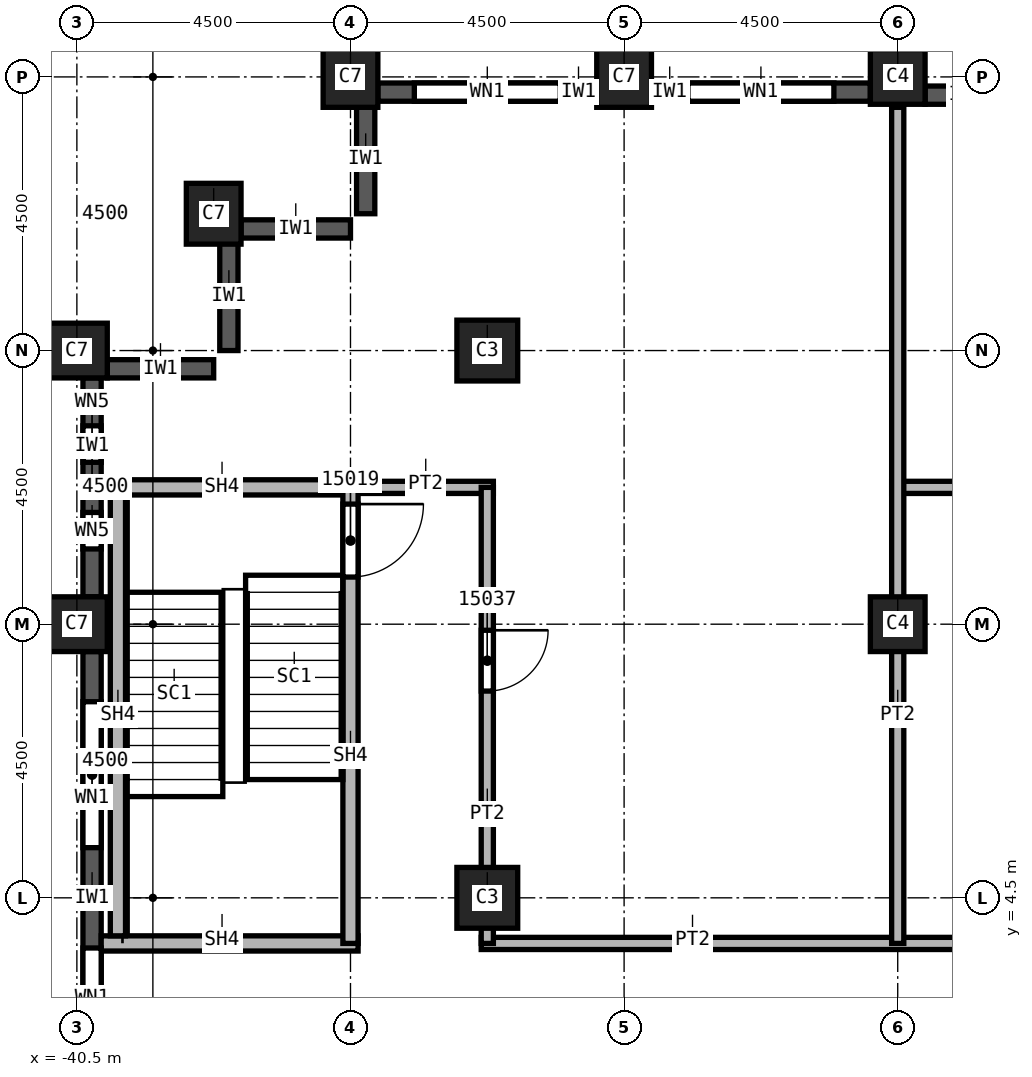
"""IFC4 building model, lengths in metres.
Left out: names, types, materials, properties, quantities, classifications, styles, units other than length and angle.
Written with IfcOpenShell. Run it as: python <this file> out.ifc"""

import sys

from ifc_helpers import new_model, si_unit, direction, frame, frame_2d, origin, origin_2d, place, context, subcontext, project, spatial, rectangle, extrude, element, fill, save


model = new_model("IFC4")
c1 = context("Model", 3, precision=1e-05, world=origin(), true_north=direction((0.0, 1.0)))
c2 = subcontext(c1, "Body", "Model", "MODEL_VIEW")
j1 = project(units=[si_unit("LENGTHUNIT", "METRE"), si_unit("PLANEANGLEUNIT", "RADIAN")], contexts=[c1])
p1 = place(None, origin())
s1 = spatial("IfcSite", under=j1, at=p1, CompositionType="ELEMENT")
p2 = place(p1, origin())
s2 = spatial("IfcBuilding", under=s1, at=p2, CompositionType="ELEMENT")
p3 = place(p2, frame((0.0, 0.0, 228.0)))
s3 = spatial("IfcBuildingStorey", under=s2, at=p3, CompositionType="ELEMENT", Elevation=228.0)
for number, where, z_axis, x_axis in (
    (1, (-40.5, 9.0, 0.0), (0.0, 0.0, 1.0), (0.0, 1.0, 0.0)),
    (2, (-40.5, 13.5, 0.0), (0.0, 0.0, 1.0), (0.0, 1.0, 0.0)),
    (3, (-38.25, 15.75, 0.0), (0.0, 0.0, 1.0), (1.0, 0.0, 0.0)),
    (4, (-31.5, 18.0, 0.0), (0.0, 0.0, 1.0), (1.0, 0.0, 0.0)),
    (5, (-36.0, 18.0, 0.0), (0.0, 0.0, 1.0), (1.0, 0.0, 0.0)),
):
    element("IfcColumn", number, at=place(p3, frame(where, z_axis=z_axis, x_axis=x_axis)), inside=s3, PredefinedType="COLUMN", context=c2, shape_type="SweptSolid", body=[
        extrude(rectangle(XDim=0.9, YDim=1.0, at=origin_2d()), origin(), (0.0, 0.0, 1.0), 3.72),
    ])
for number, where, z_axis, x_axis in (
    (6, (-33.75, 4.5, 0.0), (0.0, 0.0, 1.0), (1.0, 0.0, 0.0)),
    (7, (-33.75, 13.5, 0.0), (0.0, 0.0, 1.0), (1.0, 0.0, 0.0)),
):
    element("IfcColumn", number, at=place(p3, frame(where, z_axis=z_axis, x_axis=x_axis)), inside=s3, PredefinedType="COLUMN", context=c2, shape_type="SweptSolid", body=[
        extrude(rectangle(XDim=1.0, YDim=1.0, at=origin_2d()), origin(), (0.0, 0.0, 1.0), 3.72),
    ])
for number, where, z_axis, x_axis in (
    (8, (-27.0, 9.0, 0.0), (0.0, 0.0, 1.0), (1.0, 0.0, 0.0)),
    (9, (-27.0, 18.0, 0.0), (0.0, 0.0, 1.0), (1.0, 0.0, 0.0)),
):
    element("IfcColumn", number, at=place(p3, frame(where, z_axis=z_axis, x_axis=x_axis)), inside=s3, PredefinedType="COLUMN", context=c2, shape_type="SweptSolid", body=[
        extrude(rectangle(XDim=0.9, YDim=0.9, at=origin_2d()), origin(), (0.0, 0.0, 1.0), 3.72),
    ])
for number, where, z_axis, x_axis in (
    (10, (-35.75, 17.55, 0.0), (0.0, 0.0, 1.0), (0.0, -1.0, 0.0)),
    (11, (-37.8, 15.5, 0.0), (0.0, 0.0, 1.0), (1.0, 0.0, 0.0)),
    (12, (-38.0, 15.3, 0.0), (0.0, 0.0, 1.0), (0.0, -1.0, 0.0)),
):
    element("IfcWall", number, at=place(p3, frame(where, z_axis=z_axis, x_axis=x_axis)), inside=s3, PredefinedType="SOLIDWALL", context=c2, shape_type="SweptSolid", body=[
        extrude(rectangle(XDim=1.8, YDim=0.3, at=frame_2d((0.9, 0.0))), origin(), (0.0, 0.0, 1.0), 3.12),
    ])
p4 = place(p3, frame((-40.0, 13.2, 0.0), z_axis=(0.0, 0.0, 1.0), x_axis=(1.0, 0.0, 0.0)))
e13 = element("IfcWall", 13, at=p4, inside=s3, PredefinedType="SOLIDWALL", context=c2, shape_type="SweptSolid", body=[
    extrude(rectangle(XDim=1.75, YDim=0.3, at=frame_2d((0.875, 0.0))), origin(), (0.0, 0.0, 1.0), 3.12),
])
p5 = place(p3, frame((-25.2, 17.7, 0.0), z_axis=(0.0, 0.0, 1.0), x_axis=(-1.0, 0.0, 0.0)))
e14 = element("IfcWall", 14, at=p5, inside=s3, PredefinedType="SOLIDWALL", context=c2, shape_type="SweptSolid", body=[
    extrude(rectangle(XDim=1.35, YDim=0.3, at=frame_2d((0.675, 0.0))), origin(), (0.0, 0.0, 1.0), 3.12),
])
p6 = place(p3, frame((-27.45, 17.75, 0.0), z_axis=(0.0, 0.0, 1.0), x_axis=(-1.0, 0.0, 0.0)))
e15 = element("IfcWall", 15, at=p6, inside=s3, PredefinedType="SOLIDWALL", context=c2, shape_type="SweptSolid", body=[
    extrude(rectangle(XDim=3.6, YDim=0.3, at=frame_2d((1.8, 0.0))), origin(), (0.0, 0.0, 1.0), 3.12),
])
p7 = place(p6, frame((0.6, 0.0, 0.8)))
e16 = element("IfcOpeningElement", 16, at=p7, cuts=e15, PredefinedType="OPENING", context=c2, shape_type="SweptSolid", body=[
    extrude(rectangle(XDim=2.4, YDim=1.95, at=frame_2d((1.2, 0.975))), frame((0.0, 0.15, 0.0), z_axis=(0.0, -1.0, 0.0), x_axis=(1.0, 0.0, 0.0)), (0.0, 0.0, 1.0), 0.3),
])
p8 = place(p3, frame((-31.95, 17.75, 0.0), z_axis=(0.0, 0.0, 1.0), x_axis=(-1.0, 0.0, 0.0)))
e17 = element("IfcWall", 17, at=p8, inside=s3, PredefinedType="SOLIDWALL", context=c2, shape_type="SweptSolid", body=[
    extrude(rectangle(XDim=3.6, YDim=0.3, at=frame_2d((1.8, 0.0))), origin(), (0.0, 0.0, 1.0), 3.12),
])
p9 = place(p8, frame((0.6, 0.0, 0.8)))
e18 = element("IfcOpeningElement", 18, at=p9, cuts=e17, PredefinedType="OPENING", context=c2, shape_type="SweptSolid", body=[
    extrude(rectangle(XDim=2.4, YDim=1.95, at=frame_2d((1.2, 0.975))), frame((0.0, 0.15, 0.0), z_axis=(0.0, -1.0, 0.0), x_axis=(1.0, 0.0, 0.0)), (0.0, 0.0, 1.0), 0.3),
])
p10 = place(p3, frame((-40.25, 13.05, 0.0), z_axis=(0.0, 0.0, 1.0), x_axis=(0.0, -1.0, 0.0)))
e19 = element("IfcWall", 19, at=p10, inside=s3, PredefinedType="SOLIDWALL", context=c2, shape_type="SweptSolid", body=[
    extrude(rectangle(XDim=3.6, YDim=0.3, at=frame_2d((1.8, 0.0))), origin(), (0.0, 0.0, 1.0), 3.12),
])
p11 = place(p10, frame((0.788, 0.0, 0.8)))
e20 = element("IfcOpeningElement", 20, at=p11, cuts=e19, PredefinedType="OPENING", context=c2, shape_type="SweptSolid", body=[
    extrude(rectangle(XDim=0.6, YDim=1.95, at=frame_2d((0.3, 0.975))), frame((0.0, 0.15, 0.0), z_axis=(0.0, -1.0, 0.0), x_axis=(1.0, 0.0, 0.0)), (0.0, 0.0, 1.0), 0.3),
])
p12 = place(p10, frame((2.212, 0.0, 0.8)))
e21 = element("IfcOpeningElement", 21, at=p12, cuts=e19, PredefinedType="OPENING", context=c2, shape_type="SweptSolid", body=[
    extrude(rectangle(XDim=0.6, YDim=1.95, at=frame_2d((0.3, 0.975))), frame((0.0, 0.15, 0.0), z_axis=(0.0, -1.0, 0.0), x_axis=(1.0, 0.0, 0.0)), (0.0, 0.0, 1.0), 0.3),
])
p13 = place(p3, frame((-40.25, 8.55, 0.0), z_axis=(0.0, 0.0, 1.0), x_axis=(0.0, -1.0, 0.0)))
e22 = element("IfcWall", 22, at=p13, inside=s3, PredefinedType="SOLIDWALL", context=c2, shape_type="SweptSolid", body=[
    extrude(rectangle(XDim=8.1, YDim=0.3, at=frame_2d((4.05, 0.0))), origin(), (0.0, 0.0, 1.0), 3.12),
])
p14 = place(p13, frame((0.825, 0.0, 0.8)))
e23 = element("IfcOpeningElement", 23, at=p14, cuts=e22, PredefinedType="OPENING", context=c2, shape_type="SweptSolid", body=[
    extrude(rectangle(XDim=2.4, YDim=1.95, at=frame_2d((1.2, 0.975))), frame((0.0, 0.15, 0.0), z_axis=(0.0, -1.0, 0.0), x_axis=(1.0, 0.0, 0.0)), (0.0, 0.0, 1.0), 0.3),
])
p15 = place(p13, frame((4.875, 0.0, 0.8)))
e24 = element("IfcOpeningElement", 24, at=p15, cuts=e22, PredefinedType="OPENING", context=c2, shape_type="SweptSolid", body=[
    extrude(rectangle(XDim=2.4, YDim=1.95, at=frame_2d((1.2, 0.975))), frame((0.0, 0.15, 0.0), z_axis=(0.0, -1.0, 0.0), x_axis=(1.0, 0.0, 0.0)), (0.0, 0.0, 1.0), 0.3),
])
p16 = place(p3, frame((-36.0, 11.25, 0.0), z_axis=(0.0, 0.0, 1.0), x_axis=(1.0, 0.0, 0.0)))
e25 = element("IfcWall", 25, at=p16, inside=s3, PredefinedType="PARTITIONING", context=c2, shape_type="SweptSolid", body=[
    extrude(rectangle(XDim=2.35, YDim=0.2, at=frame_2d((1.175, 0.0))), origin(), (0.0, 0.0, 1.0), 3.72),
])
p17 = place(p3, frame((-33.85, 3.75, 0.0), z_axis=(0.0, 0.0, 1.0), x_axis=(1.0, 0.0, 0.0)))
e26 = element("IfcWall", 26, at=p17, inside=s3, PredefinedType="PARTITIONING", context=c2, shape_type="SweptSolid", body=[
    extrude(rectangle(XDim=18.45, YDim=0.2, at=frame_2d((9.225, 0.0))), origin(), (0.0, 0.0, 1.0), 3.72),
])
p18 = place(p17, frame((11.2, 0.0, 0.0)))
e27 = element("IfcOpeningElement", 27, at=p18, cuts=e26, PredefinedType="OPENING", context=c2, shape_type="SweptSolid", body=[
    extrude(rectangle(XDim=1.0, YDim=2.1, at=frame_2d((0.5, 1.05))), frame((0.0, 0.1, 0.0), z_axis=(0.0, -1.0, 0.0), x_axis=(1.0, 0.0, 0.0)), (0.0, 0.0, 1.0), 0.2),
])
p19 = place(p3, frame((-33.75, 11.25, 0.0), z_axis=(0.0, 0.0, 1.0), x_axis=(0.0, -1.0, 0.0)))
e28 = element("IfcWall", 28, at=p19, inside=s3, PredefinedType="PARTITIONING", context=c2, shape_type="SweptSolid", body=[
    extrude(rectangle(XDim=7.5, YDim=0.2, at=frame_2d((3.75, 0.0))), origin(), (0.0, 0.0, 1.0), 3.72),
])
p20 = place(p19, frame((2.35, 0.0, 0.0)))
e29 = element("IfcOpeningElement", 29, at=p20, cuts=e28, PredefinedType="OPENING", context=c2, shape_type="SweptSolid", body=[
    extrude(rectangle(XDim=1.0, YDim=2.1, at=frame_2d((0.5, 1.05))), frame((0.0, 0.1, 0.0), z_axis=(0.0, -1.0, 0.0), x_axis=(1.0, 0.0, 0.0)), (0.0, 0.0, 1.0), 0.2),
])
p21 = place(p3, frame((-27.1, 11.25, 0.0), z_axis=(0.0, 0.0, 1.0), x_axis=(1.0, 0.0, 0.0)))
e30 = element("IfcWall", 30, at=p21, inside=s3, PredefinedType="PARTITIONING", context=c2, shape_type="SweptSolid", body=[
    extrude(rectangle(XDim=6.55, YDim=0.2, at=frame_2d((3.275, 0.0))), origin(), (0.0, 0.0, 1.0), 3.72),
])
p22 = place(p3, frame((-27.0, 3.75, 0.0), z_axis=(0.0, 0.0, 1.0), x_axis=(0.0, 1.0, 0.0)))
e31 = element("IfcWall", 31, at=p22, inside=s3, PredefinedType="PARTITIONING", context=c2, shape_type="SweptSolid", body=[
    extrude(rectangle(XDim=13.75, YDim=0.2, at=frame_2d((6.875, 0.0))), origin(), (0.0, 0.0, 1.0), 3.72),
])
p23 = place(p3, frame((-40.1, 3.75, 0.0), z_axis=(0.0, 0.0, 1.0), x_axis=(1.0, 0.0, 0.0)))
e32 = element("IfcWall", 32, at=p23, inside=s3, PredefinedType="SOLIDWALL", context=c2, shape_type="SweptSolid", body=[
    extrude(rectangle(XDim=4.225, YDim=0.25, at=frame_2d((2.113, 0.0))), origin(), (0.0, 0.0, 1.0), 3.72),
])
p24 = place(p3, frame((-40.1, 11.25, 0.0), z_axis=(0.0, 0.0, 1.0), x_axis=(1.0, 0.0, 0.0)))
e33 = element("IfcWall", 33, at=p24, inside=s3, PredefinedType="SOLIDWALL", context=c2, shape_type="SweptSolid", body=[
    extrude(rectangle(XDim=4.1, YDim=0.25, at=frame_2d((2.05, 0.0))), origin(), (0.0, 0.0, 1.0), 3.72),
])
p25 = place(p3, frame((-36.0, 11.375, 0.0), z_axis=(0.0, 0.0, 1.0), x_axis=(0.0, -1.0, 0.0)))
e34 = element("IfcWall", 34, at=p25, inside=s3, PredefinedType="SOLIDWALL", context=c2, shape_type="SweptSolid", body=[
    extrude(rectangle(XDim=7.625, YDim=0.25, at=frame_2d((3.812, 0.0))), origin(), (0.0, 0.0, 1.0), 3.72),
])
p26 = place(p25, frame((0.4, 0.0, 0.0)))
e35 = element("IfcOpeningElement", 35, at=p26, cuts=e34, PredefinedType="OPENING", context=c2, shape_type="SweptSolid", body=[
    extrude(rectangle(XDim=1.2, YDim=2.1, at=frame_2d((0.6, 1.05))), frame((0.0, 0.125, 0.0), z_axis=(0.0, -1.0, 0.0), x_axis=(1.0, 0.0, 0.0)), (0.0, 0.0, 1.0), 0.25),
])
p27 = place(p3, frame((-39.825, 3.875, 0.0), z_axis=(0.0, 0.0, 1.0), x_axis=(0.0, 1.0, 0.0)))
e36 = element("IfcWall", 36, at=p27, inside=s3, PredefinedType="SOLIDWALL", context=c2, shape_type="SweptSolid", body=[
    extrude(rectangle(XDim=7.25, YDim=0.25, at=frame_2d((3.625, 0.0))), origin(), (0.0, 0.0, 1.0), 3.72),
])
p28 = place(p7, origin())
e37 = element("IfcWindow", 37, at=p28, inside=s3, PartitioningType="SINGLE_PANEL", PredefinedType="WINDOW", context=c2, shape_type="SweptSolid", body=[
    extrude(rectangle(XDim=2.4, YDim=1.95, at=frame_2d((1.2, 0.975))), frame((0.0, 0.03, 0.0), z_axis=(0.0, -1.0, 0.0), x_axis=(1.0, 0.0, 0.0)), (0.0, 0.0, 1.0), 0.06),
])
fill(e16, e37)
p29 = place(p9, origin())
e38 = element("IfcWindow", 38, at=p29, inside=s3, PartitioningType="SINGLE_PANEL", PredefinedType="WINDOW", context=c2, shape_type="SweptSolid", body=[
    extrude(rectangle(XDim=2.4, YDim=1.95, at=frame_2d((1.2, 0.975))), frame((0.0, 0.03, 0.0), z_axis=(0.0, -1.0, 0.0), x_axis=(1.0, 0.0, 0.0)), (0.0, 0.0, 1.0), 0.06),
])
fill(e18, e38)
p30 = place(p14, origin())
e39 = element("IfcWindow", 39, at=p30, inside=s3, PartitioningType="SINGLE_PANEL", PredefinedType="WINDOW", context=c2, shape_type="SweptSolid", body=[
    extrude(rectangle(XDim=2.4, YDim=1.95, at=frame_2d((1.2, 0.975))), frame((0.0, 0.03, 0.0), z_axis=(0.0, -1.0, 0.0), x_axis=(1.0, 0.0, 0.0)), (0.0, 0.0, 1.0), 0.06),
])
fill(e23, e39)
p31 = place(p15, origin())
e40 = element("IfcWindow", 40, at=p31, inside=s3, PartitioningType="SINGLE_PANEL", PredefinedType="WINDOW", context=c2, shape_type="SweptSolid", body=[
    extrude(rectangle(XDim=2.4, YDim=1.95, at=frame_2d((1.2, 0.975))), frame((0.0, 0.03, 0.0), z_axis=(0.0, -1.0, 0.0), x_axis=(1.0, 0.0, 0.0)), (0.0, 0.0, 1.0), 0.06),
])
fill(e24, e40)
p32 = place(p26, origin())
e41 = element("IfcDoor", 41, at=p32, inside=s3, OperationType="SINGLE_SWING_RIGHT", PredefinedType="DOOR", context=c2, shape_type="SweptSolid", body=[
    extrude(rectangle(XDim=1.2, YDim=2.1, at=frame_2d((0.6, 1.05))), frame((0.0, 0.025, 0.0), z_axis=(0.0, -1.0, 0.0), x_axis=(1.0, 0.0, 0.0)), (0.0, 0.0, 1.0), 0.05),
])
fill(e35, e41)
p33 = place(p20, origin())
e42 = element("IfcDoor", 42, at=p33, inside=s3, OperationType="SINGLE_SWING_RIGHT", PredefinedType="DOOR", context=c2, shape_type="SweptSolid", body=[
    extrude(rectangle(XDim=1.0, YDim=2.1, at=frame_2d((0.5, 1.05))), frame((0.0, 0.025, 0.0), z_axis=(0.0, -1.0, 0.0), x_axis=(1.0, 0.0, 0.0)), (0.0, 0.0, 1.0), 0.05),
])
fill(e29, e42)
p34 = place(p11, origin())
e43 = element("IfcWindow", 43, at=p34, inside=s3, PartitioningType="SINGLE_PANEL", PredefinedType="WINDOW", context=c2, shape_type="SweptSolid", body=[
    extrude(rectangle(XDim=0.6, YDim=1.95, at=frame_2d((0.3, 0.975))), frame((0.0, 0.03, 0.0), z_axis=(0.0, -1.0, 0.0), x_axis=(1.0, 0.0, 0.0)), (0.0, 0.0, 1.0), 0.06),
])
fill(e20, e43)
p35 = place(p12, origin())
e44 = element("IfcWindow", 44, at=p35, inside=s3, PartitioningType="SINGLE_PANEL", PredefinedType="WINDOW", context=c2, shape_type="SweptSolid", body=[
    extrude(rectangle(XDim=0.6, YDim=1.95, at=frame_2d((0.3, 0.975))), frame((0.0, 0.03, 0.0), z_axis=(0.0, -1.0, 0.0), x_axis=(1.0, 0.0, 0.0)), (0.0, 0.0, 1.0), 0.06),
])
fill(e21, e44)
save(model, sys.argv[1])
